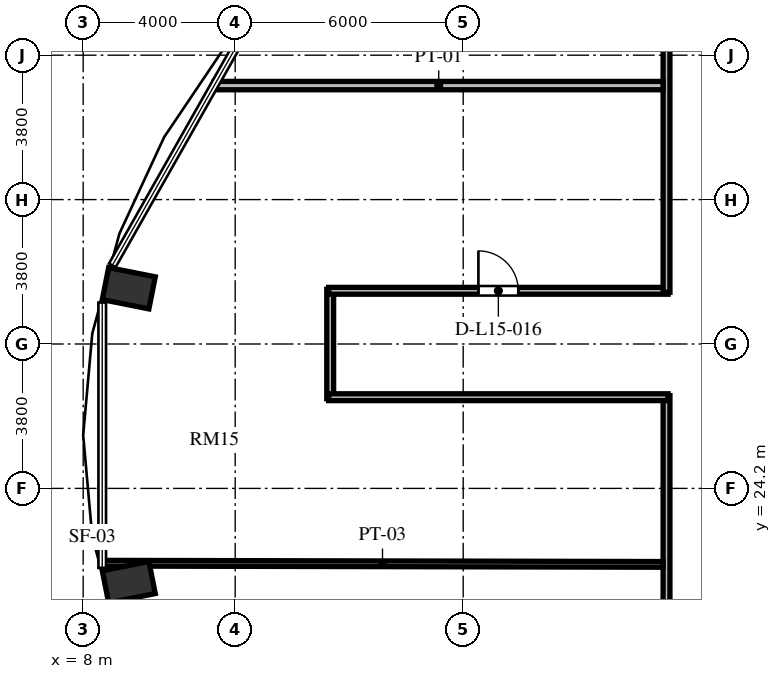
"""IFC4 building model, lengths in metres.
Left out: names, types, materials, properties, quantities, classifications, styles, units other than length and angle.
Written with IfcOpenShell. Run it as: python <this file> out.ifc"""

import sys

from ifc_helpers import new_model, si_unit, direction, frame, frame_2d, origin, origin_2d, place, context, subcontext, project, spatial, rectangle, extrude, element, fill, save


model = new_model("IFC4")
c1 = context("Model", 3, precision=1e-05, world=origin(), true_north=direction((0.0, 1.0)))
c2 = subcontext(c1, "Body", "Model", "MODEL_VIEW")
j1 = project(units=[si_unit("LENGTHUNIT", "METRE"), si_unit("PLANEANGLEUNIT", "RADIAN")], contexts=[c1])
p1 = place(None, origin())
s1 = spatial("IfcSite", under=j1, at=p1, CompositionType="ELEMENT")
p2 = place(p1, origin())
s2 = spatial("IfcBuilding", under=s1, at=p2, CompositionType="ELEMENT")
p3 = place(p2, frame((0.0, 0.0, 61.68)))
s3 = spatial("IfcBuildingStorey", under=s2, at=p3, CompositionType="ELEMENT", Elevation=61.68)
for number, where, z_axis, x_axis in (
    (1, (9.2, 29.468, 0.0), (0.0, 0.0, 1.0), (-0.981, 0.195, 0.0)),
    (2, (9.2, 21.732, 0.0), (0.0, 0.0, 1.0), (-0.981, -0.195, 0.0)),
):
    element("IfcColumn", number, at=place(p3, frame(where, z_axis=z_axis, x_axis=x_axis)), inside=s3, PredefinedType="COLUMN", context=c2, shape_type="SweptSolid", body=[
        extrude(rectangle(XDim=1.25, YDim=0.86, at=origin_2d()), origin(), (0.0, 0.0, 1.0), 3.648),
    ])
p4 = place(p3, frame((14.5, 26.56, 0.0), z_axis=(0.0, 0.0, 1.0), x_axis=(0.0, 1.0, 0.0)))
e3 = element("IfcWall", 3, at=p4, inside=s3, PredefinedType="PARTITIONING", context=c2, shape_type="SweptSolid", body=[
    extrude(rectangle(XDim=2.88, YDim=0.18, at=frame_2d((1.44, 0.0))), origin(), (0.0, 0.0, 1.0), 3.428),
])
p5 = place(p3, frame((14.46, 29.4, 0.0), z_axis=(0.0, 0.0, 1.0), x_axis=(1.0, 0.0, 0.0)))
e4 = element("IfcWall", 4, at=p5, inside=s3, PredefinedType="PARTITIONING", context=c2, shape_type="SweptSolid", body=[
    extrude(rectangle(XDim=8.93, YDim=0.18, at=frame_2d((4.465, 0.0))), origin(), (0.0, 0.0, 1.0), 3.428),
])
p6 = place(p5, frame((3.94, 0.0, 0.0)))
e5 = element("IfcOpeningElement", 5, at=p6, cuts=e4, PredefinedType="OPENING", context=c2, shape_type="SweptSolid", body=[
    extrude(rectangle(XDim=1.05, YDim=2.15, at=frame_2d((0.525, 1.075))), frame((0.0, 0.1, 0.0), z_axis=(0.0, -1.0, 0.0), x_axis=(1.0, 0.0, 0.0)), (0.0, 0.0, 1.0), 0.2),
])
p7 = place(p3, frame((23.35, 29.36, 0.0), z_axis=(0.0, 0.0, 1.0), x_axis=(0.0, 1.0, 0.0)))
e6 = element("IfcWall", 6, at=p7, inside=s3, PredefinedType="PARTITIONING", context=c2, shape_type="SweptSolid", body=[
    extrude(rectangle(XDim=9.43, YDim=0.18, at=frame_2d((4.715, 0.0))), origin(), (0.0, 0.0, 1.0), 3.428),
])
p8 = place(p3, frame((23.35, 17.36, 0.0), z_axis=(0.0, 0.0, 1.0), x_axis=(0.0, 1.0, 0.0)))
e7 = element("IfcWall", 7, at=p8, inside=s3, PredefinedType="PARTITIONING", context=c2, shape_type="SweptSolid", body=[
    extrude(rectangle(XDim=9.28, YDim=0.18, at=frame_2d((4.64, 0.0))), origin(), (0.0, 0.0, 1.0), 3.428),
])
p9 = place(p3, frame((23.39, 26.6, 0.0), z_axis=(0.0, 0.0, 1.0), x_axis=(-1.0, 0.0, 0.0)))
e8 = element("IfcWall", 8, at=p9, inside=s3, PredefinedType="PARTITIONING", context=c2, shape_type="SweptSolid", body=[
    extrude(rectangle(XDim=8.93, YDim=0.18, at=frame_2d((4.465, 0.0))), origin(), (0.0, 0.0, 1.0), 3.428),
])
p10 = place(p3, frame((8.493, 22.231, 0.0), z_axis=(0.0, 0.0, 1.0), x_axis=(0.999997760873, -0.002116187438, 0.0)))
e9 = element("IfcWall", 9, at=p10, inside=s3, PredefinedType="PARTITIONING", context=c2, shape_type="SweptSolid", body=[
    extrude(rectangle(XDim=14.767, YDim=0.15, at=frame_2d((7.384, 0.0))), origin(), (0.0, 0.0, 1.0), 3.428),
])
p11 = place(p3, frame((11.451, 34.8, 0.0), z_axis=(0.0, 0.0, 1.0), x_axis=(1.0, 0.0, 0.0)))
e10 = element("IfcWall", 10, at=p11, inside=s3, PredefinedType="PARTITIONING", context=c2, shape_type="SweptSolid", body=[
    extrude(rectangle(XDim=11.809, YDim=0.22, at=frame_2d((5.905, 0.0))), origin(), (0.0, 0.0, 1.0), 3.428),
])
p12 = place(p6, origin())
e11 = element("IfcDoor", 11, at=p12, inside=s3, OperationType="SINGLE_SWING_LEFT", PredefinedType="DOOR", context=c2, shape_type="SweptSolid", body=[
    extrude(rectangle(XDim=1.05, YDim=2.15, at=frame_2d((0.525, 1.075))), frame((0.0, 0.025, 0.0), z_axis=(0.0, -1.0, 0.0), x_axis=(1.0, 0.0, 0.0)), (0.0, 0.0, 1.0), 0.05),
])
fill(e5, e11)
save(model, sys.argv[1])
